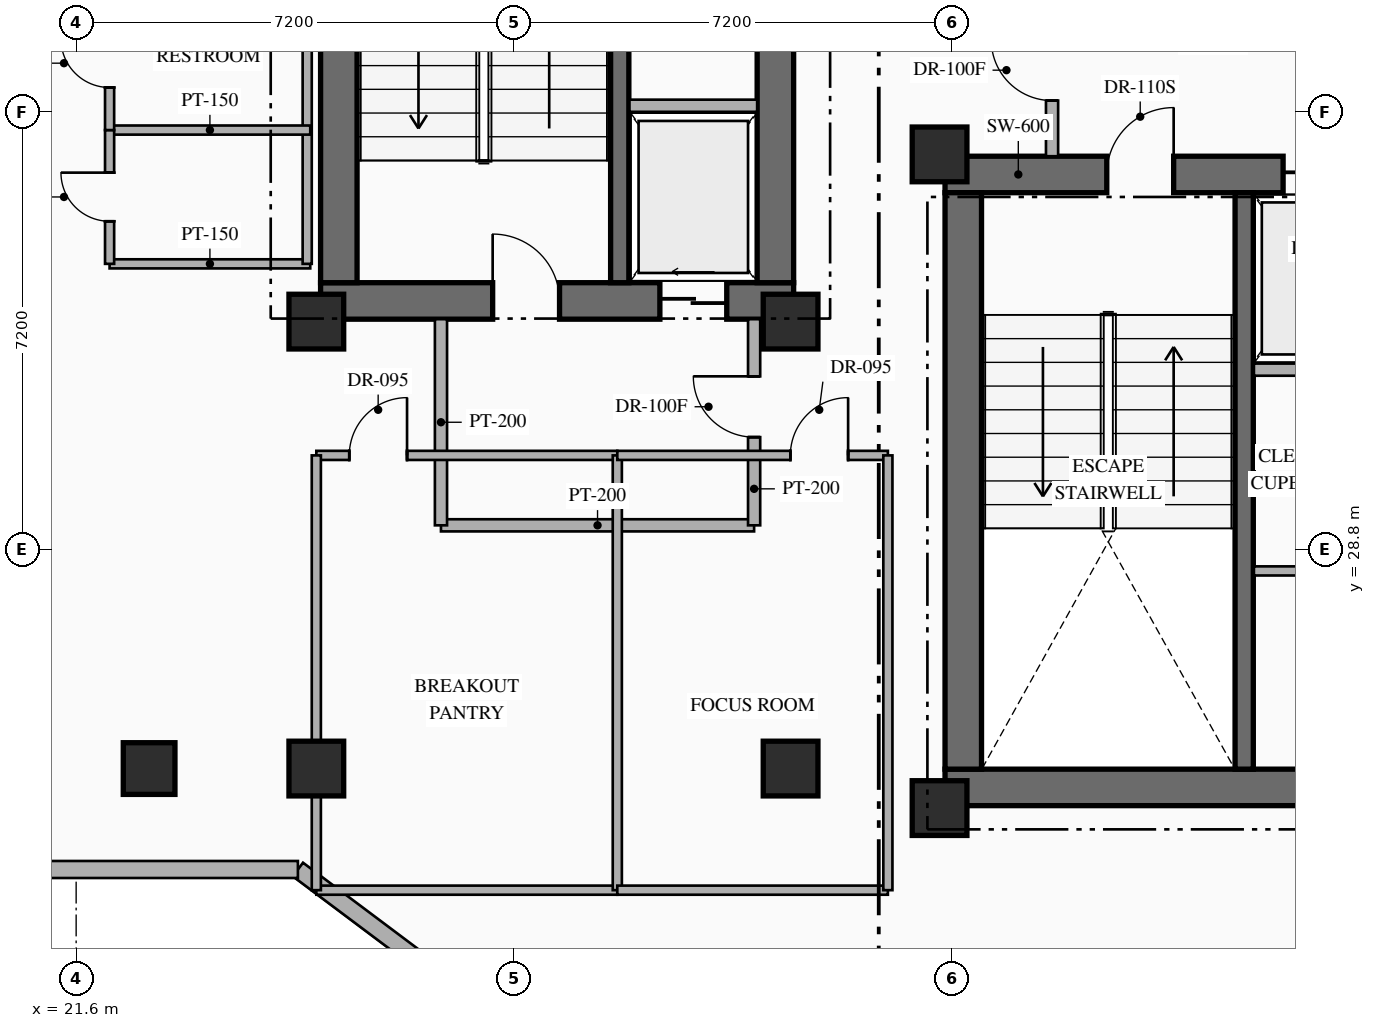
"""IFC4 building model, lengths in metres.
Left out: names, types, materials, properties, quantities, classifications, styles, units other than length and angle.
Written with IfcOpenShell. Run it as: python <this file> out.ifc"""

import sys

from ifc_helpers import new_model, si_unit, direction, frame, frame_2d, origin, origin_2d, place, context, subcontext, project, spatial, rectangle, hollow_rectangle, extrude, element, fill, save


model = new_model("IFC4")
c1 = context("Model", 3, precision=1e-05, world=origin(), true_north=direction((0.0, 1.0)))
c2 = subcontext(c1, "Body", "Model", "MODEL_VIEW")
j1 = project(units=[si_unit("LENGTHUNIT", "METRE"), si_unit("PLANEANGLEUNIT", "RADIAN")], contexts=[c1])
p1 = place(None, origin())
s1 = spatial("IfcSite", under=j1, at=p1, CompositionType="ELEMENT")
p2 = place(p1, origin())
s2 = spatial("IfcBuilding", under=s1, at=p2, CompositionType="ELEMENT")
p3 = place(p2, frame((0.0, 0.0, 112.05)))
s3 = spatial("IfcBuildingStorey", under=s2, at=p3, CompositionType="ELEMENT", Elevation=112.05)
p4 = place(p3, frame((25.62, 32.89, 0.0), z_axis=(0.0, 0.0, 1.0), x_axis=(1.0, 0.0, 0.0)))
e1 = element("IfcWall", 1, at=p4, inside=s3, PredefinedType="SHEAR", context=c2, shape_type="SweptSolid", body=[
    extrude(rectangle(XDim=7.78, YDim=0.6, at=frame_2d((3.89, 0.0))), origin(), (0.0, 0.0, 1.0), 3.6),
])
p5 = place(p4, frame((2.83, 0.0, 0.0)))
e2 = element("IfcOpeningElement", 2, at=p5, cuts=e1, PredefinedType="OPENING", context=c2, shape_type="SweptSolid", body=[
    extrude(rectangle(XDim=1.1, YDim=2.2, at=frame_2d((0.55, 1.1))), frame((0.0, 0.31, 0.0), z_axis=(0.0, -1.0, 0.0), x_axis=(1.0, 0.0, 0.0)), (0.0, 0.0, 1.0), 0.62),
])
p6 = place(p4, frame((5.58, 0.0, 0.0)))
e3 = element("IfcOpeningElement", 3, at=p6, cuts=e1, PredefinedType="OPENING", context=c2, shape_type="SweptSolid", body=[
    extrude(rectangle(XDim=1.1, YDim=2.15, at=frame_2d((0.55, 1.075))), frame((0.0, 0.31, 0.0), z_axis=(0.0, -1.0, 0.0), x_axis=(1.0, 0.0, 0.0)), (0.0, 0.0, 1.0), 0.62),
])
p7 = place(p3, frame((25.92, 33.19, 0.0), z_axis=(0.0, 0.0, 1.0), x_axis=(0.0, 1.0, 0.0)))
e4 = element("IfcWall", 4, at=p7, inside=s3, PredefinedType="SHEAR", context=c2, shape_type="SweptSolid", body=[
    extrude(rectangle(XDim=9.48, YDim=0.6, at=frame_2d((4.74, 0.0))), origin(), (0.0, 0.0, 1.0), 3.6),
])
p8 = place(p3, frame((33.1, 33.19, 0.0), z_axis=(0.0, 0.0, 1.0), x_axis=(0.0, 1.0, 0.0)))
e5 = element("IfcWall", 5, at=p8, inside=s3, PredefinedType="SHEAR", context=c2, shape_type="SweptSolid", body=[
    extrude(rectangle(XDim=9.48, YDim=0.6, at=frame_2d((4.74, 0.0))), origin(), (0.0, 0.0, 1.0), 3.6),
])
p9 = place(p8, frame((4.16, 0.0, 0.0)))
e6 = element("IfcOpeningElement", 6, at=p9, cuts=e5, PredefinedType="OPENING", context=c2, shape_type="SweptSolid", body=[
    extrude(rectangle(XDim=0.85, YDim=2.08, at=frame_2d((0.425, 1.04))), frame((0.0, 0.31, 0.0), z_axis=(0.0, -1.0, 0.0), x_axis=(1.0, 0.0, 0.0)), (0.0, 0.0, 1.0), 0.62),
])
p10 = place(p8, frame((7.36, 0.0, 0.0)))
e7 = element("IfcOpeningElement", 7, at=p10, cuts=e5, PredefinedType="OPENING", context=c2, shape_type="SweptSolid", body=[
    extrude(rectangle(XDim=0.85, YDim=2.08, at=frame_2d((0.425, 1.04))), frame((0.0, 0.31, 0.0), z_axis=(0.0, -1.0, 0.0), x_axis=(1.0, 0.0, 0.0)), (0.0, 0.0, 1.0), 0.62),
])
p11 = place(p3, frame((30.54, 33.19, 0.0), z_axis=(0.0, 0.0, 1.0), x_axis=(0.0, 1.0, 0.0)))
e8 = element("IfcWall", 8, at=p11, inside=s3, PredefinedType="SHEAR", context=c2, shape_type="SweptSolid", body=[
    extrude(rectangle(XDim=9.48, YDim=0.3, at=frame_2d((4.74, 0.0))), origin(), (0.0, 0.0, 1.0), 3.6),
])
p12 = place(p3, frame((35.89, 24.89, 0.0), z_axis=(0.0, 0.0, 1.0), x_axis=(1.0, 0.0, 0.0)))
e9 = element("IfcWall", 9, at=p12, inside=s3, PredefinedType="SHEAR", context=c2, shape_type="SweptSolid", body=[
    extrude(rectangle(XDim=7.76, YDim=0.6, at=frame_2d((3.88, 0.0))), origin(), (0.0, 0.0, 1.0), 3.6),
])
p13 = place(p3, frame((35.89, 34.97, 0.0), z_axis=(0.0, 0.0, 1.0), x_axis=(1.0, 0.0, 0.0)))
e10 = element("IfcWall", 10, at=p13, inside=s3, PredefinedType="SHEAR", context=c2, shape_type="SweptSolid", body=[
    extrude(rectangle(XDim=7.76, YDim=0.6, at=frame_2d((3.88, 0.0))), origin(), (0.0, 0.0, 1.0), 3.6),
])
p14 = place(p13, frame((2.66, 0.0, 0.0)))
e11 = element("IfcOpeningElement", 11, at=p14, cuts=e10, PredefinedType="OPENING", context=c2, shape_type="SweptSolid", body=[
    extrude(rectangle(XDim=1.1, YDim=2.2, at=frame_2d((0.55, 1.1))), frame((0.0, 0.31, 0.0), z_axis=(0.0, -1.0, 0.0), x_axis=(1.0, 0.0, 0.0)), (0.0, 0.0, 1.0), 0.62),
])
p15 = place(p13, frame((5.56, 0.0, 0.0)))
e12 = element("IfcOpeningElement", 12, at=p15, cuts=e10, PredefinedType="OPENING", context=c2, shape_type="SweptSolid", body=[
    extrude(rectangle(XDim=1.12, YDim=2.15, at=frame_2d((0.56, 1.075))), frame((0.0, 0.31, 0.0), z_axis=(0.0, -1.0, 0.0), x_axis=(1.0, 0.0, 0.0)), (0.0, 0.0, 1.0), 0.62),
])
p16 = place(p3, frame((36.19, 25.19, 0.0), z_axis=(0.0, 0.0, 1.0), x_axis=(0.0, 1.0, 0.0)))
e13 = element("IfcWall", 13, at=p16, inside=s3, PredefinedType="SHEAR", context=c2, shape_type="SweptSolid", body=[
    extrude(rectangle(XDim=9.48, YDim=0.6, at=frame_2d((4.74, 0.0))), origin(), (0.0, 0.0, 1.0), 3.6),
])
p17 = place(p3, frame((40.81, 25.19, 0.0), z_axis=(0.0, 0.0, 1.0), x_axis=(0.0, 1.0, 0.0)))
e14 = element("IfcWall", 14, at=p17, inside=s3, PredefinedType="SHEAR", context=c2, shape_type="SweptSolid", body=[
    extrude(rectangle(XDim=9.48, YDim=0.3, at=frame_2d((4.74, 0.0))), origin(), (0.0, 0.0, 1.0), 3.6),
])
for number, where, z_axis, x_axis in (
    (15, (25.55, 32.55, 0.0), (0.0, 0.0, 1.0), (1.0, 0.0, 0.0)),
    (16, (33.35, 32.55, 0.0), (0.0, 0.0, 1.0), (1.0, 0.0, 0.0)),
    (17, (35.8, 24.55, 0.0), (0.0, 0.0, 1.0), (1.0, 0.0, 0.0)),
    (18, (35.8, 35.3, 0.0), (0.0, 0.0, 1.0), (1.0, 0.0, 0.0)),
):
    element("IfcColumn", number, at=place(p3, frame(where, z_axis=z_axis, x_axis=x_axis)), inside=s3, PredefinedType="COLUMN", context=c2, shape_type="SweptSolid", body=[
        extrude(rectangle(XDim=0.9, YDim=0.9, at=origin_2d()), origin(), (0.0, 0.0, 1.0), 3.6),
    ])
for number, where, z_axis, x_axis in (
    (19, (25.55, 25.2, 0.0), (0.0, 0.0, 1.0), (1.0, 0.0, 0.0)),
    (20, (33.35, 25.2, 0.0), (0.0, 0.0, 1.0), (1.0, 0.0, 0.0)),
):
    element("IfcColumn", number, at=place(p3, frame(where, z_axis=z_axis, x_axis=x_axis)), inside=s3, PredefinedType="COLUMN", context=c2, shape_type="SweptSolid", body=[
        extrude(hollow_rectangle(XDim=0.9, YDim=0.9, WallThickness=0.036, at=origin_2d()), origin(), (0.0, 0.0, 1.0), 3.6),
    ])
p18 = place(p3, frame((22.8, 25.2, 0.0), z_axis=(0.0, 0.0, 1.0), x_axis=(1.0, 0.0, 0.0)))
e21 = element("IfcColumn", 21, at=p18, inside=s3, PredefinedType="COLUMN", context=c2, shape_type="SweptSolid", body=[
    extrude(hollow_rectangle(XDim=0.85, YDim=0.85, WallThickness=0.032, at=origin_2d()), origin(), (0.0, 0.0, 1.0), 3.6),
])
p19 = place(p3, frame((53.318, 2.487, 0.0), z_axis=(0.0, 0.0, 1.0), x_axis=(-0.800004174678, 0.599994433723, 0.0)))
e22 = element("IfcWall", 22, at=p19, inside=s3, PredefinedType="STANDARD", context=c2, shape_type="SweptSolid", body=[
    extrude(rectangle(XDim=35.089, YDim=0.28, at=frame_2d((17.544, 0.0))), origin(), (0.0, 0.0, 1.0), 3.35),
])
p20 = place(p3, frame((25.247, 23.54, 0.0), z_axis=(0.0, 0.0, 1.0), x_axis=(-1.0, 0.0, 0.0)))
e23 = element("IfcWall", 23, at=p20, inside=s3, PredefinedType="STANDARD", context=c2, shape_type="SweptSolid", body=[
    extrude(rectangle(XDim=6.747, YDim=0.28, at=frame_2d((3.374, 0.0))), origin(), (0.0, 0.0, 1.0), 3.35),
])
p21 = place(p3, frame((30.7, 36.1, 0.0), z_axis=(0.0, 0.0, 1.0), x_axis=(1.0, 0.0, 0.0)))
e24 = element("IfcWall", 24, at=p21, inside=s3, PredefinedType="STANDARD", context=c2, shape_type="SweptSolid", body=[
    extrude(rectangle(XDim=2.1, YDim=0.2, at=frame_2d((1.05, 0.0))), origin(), (0.0, 0.0, 1.0), 3.35),
])
p22 = place(p3, frame((40.97, 31.76, 0.0), z_axis=(0.0, 0.0, 1.0), x_axis=(1.0, 0.0, 0.0)))
e25 = element("IfcWall", 25, at=p22, inside=s3, PredefinedType="STANDARD", context=c2, shape_type="SweptSolid", body=[
    extrude(rectangle(XDim=2.08, YDim=0.2, at=frame_2d((1.04, 0.0))), origin(), (0.0, 0.0, 1.0), 3.35),
])
p23 = place(p3, frame((40.97, 28.45, 0.0), z_axis=(0.0, 0.0, 1.0), x_axis=(1.0, 0.0, 0.0)))
e26 = element("IfcWall", 26, at=p23, inside=s3, PredefinedType="PARTITIONING", context=c2, shape_type="SweptSolid", body=[
    extrude(rectangle(XDim=2.08, YDim=0.15, at=frame_2d((1.04, 0.0))), origin(), (0.0, 0.0, 1.0), 3.35),
])
p24 = place(p3, frame((27.6, 29.2, 0.0), z_axis=(0.0, 0.0, 1.0), x_axis=(1.0, 0.0, 0.0)))
e27 = element("IfcWall", 27, at=p24, inside=s3, PredefinedType="STANDARD", context=c2, shape_type="SweptSolid", body=[
    extrude(rectangle(XDim=5.15, YDim=0.2, at=frame_2d((2.575, 0.0))), origin(), (0.0, 0.0, 1.0), 3.35),
])
p25 = place(p3, frame((27.6, 29.2, 0.0), z_axis=(0.0, 0.0, 1.0), x_axis=(0.0, 1.0, 0.0)))
e28 = element("IfcWall", 28, at=p25, inside=s3, PredefinedType="STANDARD", context=c2, shape_type="SweptSolid", body=[
    extrude(rectangle(XDim=3.39, YDim=0.2, at=frame_2d((1.695, 0.0))), origin(), (0.0, 0.0, 1.0), 3.35),
])
p26 = place(p3, frame((32.75, 29.2, 0.0), z_axis=(0.0, 0.0, 1.0), x_axis=(0.0, 1.0, 0.0)))
e29 = element("IfcWall", 29, at=p26, inside=s3, PredefinedType="STANDARD", context=c2, shape_type="SweptSolid", body=[
    extrude(rectangle(XDim=3.39, YDim=0.2, at=frame_2d((1.695, 0.0))), origin(), (0.0, 0.0, 1.0), 3.35),
])
p27 = place(p26, frame((1.45, 0.0, 0.0)))
e30 = element("IfcOpeningElement", 30, at=p27, cuts=e29, PredefinedType="OPENING", context=c2, shape_type="SweptSolid", body=[
    extrude(rectangle(XDim=1.0, YDim=2.2, at=frame_2d((0.5, 1.1))), frame((0.0, 0.11, 0.0), z_axis=(0.0, -1.0, 0.0), x_axis=(1.0, 0.0, 0.0)), (0.0, 0.0, 1.0), 0.22),
])
p28 = place(p3, frame((37.65, 35.27, 0.0), z_axis=(0.0, 0.0, 1.0), x_axis=(0.0, 1.0, 0.0)))
e31 = element("IfcWall", 31, at=p28, inside=s3, PredefinedType="STANDARD", context=c2, shape_type="SweptSolid", body=[
    extrude(rectangle(XDim=2.83, YDim=0.2, at=frame_2d((1.415, 0.0))), origin(), (0.0, 0.0, 1.0), 3.35),
])
p29 = place(p28, frame((0.915, 0.0, 0.0)))
e32 = element("IfcOpeningElement", 32, at=p29, cuts=e31, PredefinedType="OPENING", context=c2, shape_type="SweptSolid", body=[
    extrude(rectangle(XDim=1.0, YDim=2.2, at=frame_2d((0.5, 1.1))), frame((0.0, 0.11, 0.0), z_axis=(0.0, -1.0, 0.0), x_axis=(1.0, 0.0, 0.0)), (0.0, 0.0, 1.0), 0.22),
])
p30 = place(p3, frame((22.15, 33.5, 0.0), z_axis=(0.0, 0.0, 1.0), x_axis=(1.0, 0.0, 0.0)))
e33 = element("IfcWall", 33, at=p30, inside=s3, PredefinedType="PARTITIONING", context=c2, shape_type="SweptSolid", body=[
    extrude(rectangle(XDim=3.3, YDim=0.15, at=frame_2d((1.65, 0.0))), origin(), (0.0, 0.0, 1.0), 3.35),
])
p31 = place(p3, frame((25.4, 33.5, 0.0), z_axis=(0.0, 0.0, 1.0), x_axis=(0.0, 1.0, 0.0)))
e34 = element("IfcWall", 34, at=p31, inside=s3, PredefinedType="PARTITIONING", context=c2, shape_type="SweptSolid", body=[
    extrude(rectangle(XDim=6.6, YDim=0.15, at=frame_2d((3.3, 0.0))), origin(), (0.0, 0.0, 1.0), 3.35),
])
p32 = place(p3, frame((22.15, 35.7, 0.0), z_axis=(0.0, 0.0, 1.0), x_axis=(1.0, 0.0, 0.0)))
e35 = element("IfcWall", 35, at=p32, inside=s3, PredefinedType="PARTITIONING", context=c2, shape_type="SweptSolid", body=[
    extrude(rectangle(XDim=3.3, YDim=0.15, at=frame_2d((1.65, 0.0))), origin(), (0.0, 0.0, 1.0), 3.35),
])
p33 = place(p3, frame((22.15, 33.5, 0.0), z_axis=(0.0, 0.0, 1.0), x_axis=(0.0, 1.0, 0.0)))
e36 = element("IfcWall", 36, at=p33, inside=s3, PredefinedType="PARTITIONING", context=c2, shape_type="SweptSolid", body=[
    extrude(rectangle(XDim=2.2, YDim=0.15, at=frame_2d((1.1, 0.0))), origin(), (0.0, 0.0, 1.0), 3.35),
])
p34 = place(p33, frame((0.7, 0.0, 0.0)))
e37 = element("IfcOpeningElement", 37, at=p34, cuts=e36, PredefinedType="OPENING", context=c2, shape_type="SweptSolid", body=[
    extrude(rectangle(XDim=0.8, YDim=2.06, at=frame_2d((0.4, 1.03))), frame((0.0, 0.085, 0.0), z_axis=(0.0, -1.0, 0.0), x_axis=(1.0, 0.0, 0.0)), (0.0, 0.0, 1.0), 0.17),
])
p35 = place(p3, frame((22.15, 35.7, 0.0), z_axis=(0.0, 0.0, 1.0), x_axis=(0.0, 1.0, 0.0)))
e38 = element("IfcWall", 38, at=p35, inside=s3, PredefinedType="PARTITIONING", context=c2, shape_type="SweptSolid", body=[
    extrude(rectangle(XDim=2.2, YDim=0.15, at=frame_2d((1.1, 0.0))), origin(), (0.0, 0.0, 1.0), 3.35),
])
p36 = place(p35, frame((0.7, 0.0, 0.0)))
e39 = element("IfcOpeningElement", 39, at=p36, cuts=e38, PredefinedType="OPENING", context=c2, shape_type="SweptSolid", body=[
    extrude(rectangle(XDim=0.8, YDim=2.06, at=frame_2d((0.4, 1.03))), frame((0.0, 0.085, 0.0), z_axis=(0.0, -1.0, 0.0), x_axis=(1.0, 0.0, 0.0)), (0.0, 0.0, 1.0), 0.17),
])
p37 = place(p3, frame((25.55, 23.2, 0.0), z_axis=(0.0, 0.0, 1.0), x_axis=(1.0, 0.0, 0.0)))
e40 = element("IfcWall", 40, at=p37, inside=s3, PredefinedType="PARTITIONING", context=c2, shape_type="SweptSolid", body=[
    extrude(rectangle(XDim=4.95, YDim=0.15, at=frame_2d((2.475, 0.0))), origin(), (0.0, 0.0, 1.0), 3.35),
])
p38 = place(p3, frame((25.55, 30.35, 0.0), z_axis=(0.0, 0.0, 1.0), x_axis=(1.0, 0.0, 0.0)))
e41 = element("IfcWall", 41, at=p38, inside=s3, PredefinedType="PARTITIONING", context=c2, shape_type="SweptSolid", body=[
    extrude(rectangle(XDim=4.95, YDim=0.15, at=frame_2d((2.475, 0.0))), origin(), (0.0, 0.0, 1.0), 3.35),
])
p39 = place(p38, frame((0.542, 0.0, 0.0)))
e42 = element("IfcOpeningElement", 42, at=p39, cuts=e41, PredefinedType="OPENING", context=c2, shape_type="SweptSolid", body=[
    extrude(rectangle(XDim=0.95, YDim=2.15, at=frame_2d((0.475, 1.075))), frame((0.0, 0.085, 0.0), z_axis=(0.0, -1.0, 0.0), x_axis=(1.0, 0.0, 0.0)), (0.0, 0.0, 1.0), 0.17),
])
p40 = place(p3, frame((25.55, 23.2, 0.0), z_axis=(0.0, 0.0, 1.0), x_axis=(0.0, 1.0, 0.0)))
e43 = element("IfcWall", 43, at=p40, inside=s3, PredefinedType="PARTITIONING", context=c2, shape_type="SweptSolid", body=[
    extrude(rectangle(XDim=7.15, YDim=0.15, at=frame_2d((3.575, 0.0))), origin(), (0.0, 0.0, 1.0), 2.695),
])
p41 = place(p3, frame((30.5, 23.2, 0.0), z_axis=(0.0, 0.0, 1.0), x_axis=(0.0, 1.0, 0.0)))
e44 = element("IfcWall", 44, at=p41, inside=s3, PredefinedType="PARTITIONING", context=c2, shape_type="SweptSolid", body=[
    extrude(rectangle(XDim=7.15, YDim=0.15, at=frame_2d((3.575, 0.0))), origin(), (0.0, 0.0, 1.0), 3.35),
])
p42 = place(p3, frame((30.5, 23.2, 0.0), z_axis=(0.0, 0.0, 1.0), x_axis=(1.0, 0.0, 0.0)))
e45 = element("IfcWall", 45, at=p42, inside=s3, PredefinedType="PARTITIONING", context=c2, shape_type="SweptSolid", body=[
    extrude(rectangle(XDim=4.45, YDim=0.15, at=frame_2d((2.225, 0.0))), origin(), (0.0, 0.0, 1.0), 3.35),
])
p43 = place(p3, frame((30.5, 30.35, 0.0), z_axis=(0.0, 0.0, 1.0), x_axis=(1.0, 0.0, 0.0)))
e46 = element("IfcWall", 46, at=p43, inside=s3, PredefinedType="PARTITIONING", context=c2, shape_type="SweptSolid", body=[
    extrude(rectangle(XDim=4.45, YDim=0.15, at=frame_2d((2.225, 0.0))), origin(), (0.0, 0.0, 1.0), 3.35),
])
p44 = place(p43, frame((2.846, 0.0, 0.0)))
e47 = element("IfcOpeningElement", 47, at=p44, cuts=e46, PredefinedType="OPENING", context=c2, shape_type="SweptSolid", body=[
    extrude(rectangle(XDim=0.95, YDim=2.15, at=frame_2d((0.475, 1.075))), frame((0.0, 0.085, 0.0), z_axis=(0.0, -1.0, 0.0), x_axis=(1.0, 0.0, 0.0)), (0.0, 0.0, 1.0), 0.17),
])
p45 = place(p3, frame((34.95, 23.2, 0.0), z_axis=(0.0, 0.0, 1.0), x_axis=(0.0, 1.0, 0.0)))
e48 = element("IfcWall", 48, at=p45, inside=s3, PredefinedType="PARTITIONING", context=c2, shape_type="SweptSolid", body=[
    extrude(rectangle(XDim=7.15, YDim=0.15, at=frame_2d((3.575, 0.0))), origin(), (0.0, 0.0, 1.0), 3.35),
])
p46 = place(p5, origin())
e49 = element("IfcDoor", 49, at=p46, inside=s3, OperationType="SINGLE_SWING_LEFT", PredefinedType="DOOR", context=c2, shape_type="SweptSolid", body=[
    extrude(rectangle(XDim=1.1, YDim=2.2, at=frame_2d((0.55, 1.1))), frame((0.0, 0.025, 0.0), z_axis=(0.0, -1.0, 0.0), x_axis=(1.0, 0.0, 0.0)), (0.0, 0.0, 1.0), 0.05),
])
fill(e2, e49)
p47 = place(p6, origin())
e50 = element("IfcDoor", 50, at=p47, inside=s3, OperationType="SLIDING_TO_LEFT", PredefinedType="USERDEFINED", context=c2, shape_type="SweptSolid", body=[
    extrude(rectangle(XDim=1.1, YDim=2.15, at=frame_2d((0.55, 1.075))), frame((0.0, 0.025, 0.0), z_axis=(0.0, -1.0, 0.0), x_axis=(1.0, 0.0, 0.0)), (0.0, 0.0, 1.0), 0.05),
])
fill(e3, e50)
p48 = place(p14, origin())
e51 = element("IfcDoor", 51, at=p48, inside=s3, OperationType="SINGLE_SWING_RIGHT", PredefinedType="DOOR", context=c2, shape_type="SweptSolid", body=[
    extrude(rectangle(XDim=1.1, YDim=2.2, at=frame_2d((0.55, 1.1))), frame((0.0, 0.025, 0.0), z_axis=(0.0, -1.0, 0.0), x_axis=(1.0, 0.0, 0.0)), (0.0, 0.0, 1.0), 0.05),
])
fill(e11, e51)
p49 = place(p15, origin())
e52 = element("IfcDoor", 52, at=p49, inside=s3, OperationType="SLIDING_TO_RIGHT", PredefinedType="USERDEFINED", context=c2, shape_type="SweptSolid", body=[
    extrude(rectangle(XDim=1.12, YDim=2.15, at=frame_2d((0.56, 1.075))), frame((0.0, 0.025, 0.0), z_axis=(0.0, -1.0, 0.0), x_axis=(1.0, 0.0, 0.0)), (0.0, 0.0, 1.0), 0.05),
])
fill(e12, e52)
p50 = place(p27, origin())
e53 = element("IfcDoor", 53, at=p50, inside=s3, OperationType="SINGLE_SWING_RIGHT", PredefinedType="DOOR", context=c2, shape_type="SweptSolid", body=[
    extrude(rectangle(XDim=1.0, YDim=2.2, at=frame_2d((0.5, 1.1))), frame((0.0, 0.025, 0.0), z_axis=(0.0, -1.0, 0.0), x_axis=(1.0, 0.0, 0.0)), (0.0, 0.0, 1.0), 0.05),
])
fill(e30, e53)
p51 = place(p29, origin())
e54 = element("IfcDoor", 54, at=p51, inside=s3, OperationType="SINGLE_SWING_RIGHT", PredefinedType="DOOR", context=c2, shape_type="SweptSolid", body=[
    extrude(rectangle(XDim=1.0, YDim=2.2, at=frame_2d((0.5, 1.1))), frame((0.0, 0.025, 0.0), z_axis=(0.0, -1.0, 0.0), x_axis=(1.0, 0.0, 0.0)), (0.0, 0.0, 1.0), 0.05),
])
fill(e32, e54)
p52 = place(p34, origin())
e55 = element("IfcDoor", 55, at=p52, inside=s3, OperationType="SINGLE_SWING_RIGHT", PredefinedType="DOOR", context=c2, shape_type="SweptSolid", body=[
    extrude(rectangle(XDim=0.8, YDim=2.06, at=frame_2d((0.4, 1.03))), frame((0.0, 0.025, 0.0), z_axis=(0.0, -1.0, 0.0), x_axis=(1.0, 0.0, 0.0)), (0.0, 0.0, 1.0), 0.05),
])
fill(e37, e55)
p53 = place(p36, origin())
e56 = element("IfcDoor", 56, at=p53, inside=s3, OperationType="SINGLE_SWING_RIGHT", PredefinedType="DOOR", context=c2, shape_type="SweptSolid", body=[
    extrude(rectangle(XDim=0.8, YDim=2.06, at=frame_2d((0.4, 1.03))), frame((0.0, 0.025, 0.0), z_axis=(0.0, -1.0, 0.0), x_axis=(1.0, 0.0, 0.0)), (0.0, 0.0, 1.0), 0.05),
])
fill(e39, e56)
p54 = place(p39, origin())
e57 = element("IfcDoor", 57, at=p54, inside=s3, OperationType="SINGLE_SWING_RIGHT", PredefinedType="DOOR", context=c2, shape_type="SweptSolid", body=[
    extrude(rectangle(XDim=0.95, YDim=2.15, at=frame_2d((0.475, 1.075))), frame((0.0, 0.025, 0.0), z_axis=(0.0, -1.0, 0.0), x_axis=(1.0, 0.0, 0.0)), (0.0, 0.0, 1.0), 0.05),
])
fill(e42, e57)
p55 = place(p44, origin())
e58 = element("IfcDoor", 58, at=p55, inside=s3, OperationType="SINGLE_SWING_RIGHT", PredefinedType="DOOR", context=c2, shape_type="SweptSolid", body=[
    extrude(rectangle(XDim=0.95, YDim=2.15, at=frame_2d((0.475, 1.075))), frame((0.0, 0.025, 0.0), z_axis=(0.0, -1.0, 0.0), x_axis=(1.0, 0.0, 0.0)), (0.0, 0.0, 1.0), 0.05),
])
fill(e47, e58)
save(model, sys.argv[1])
